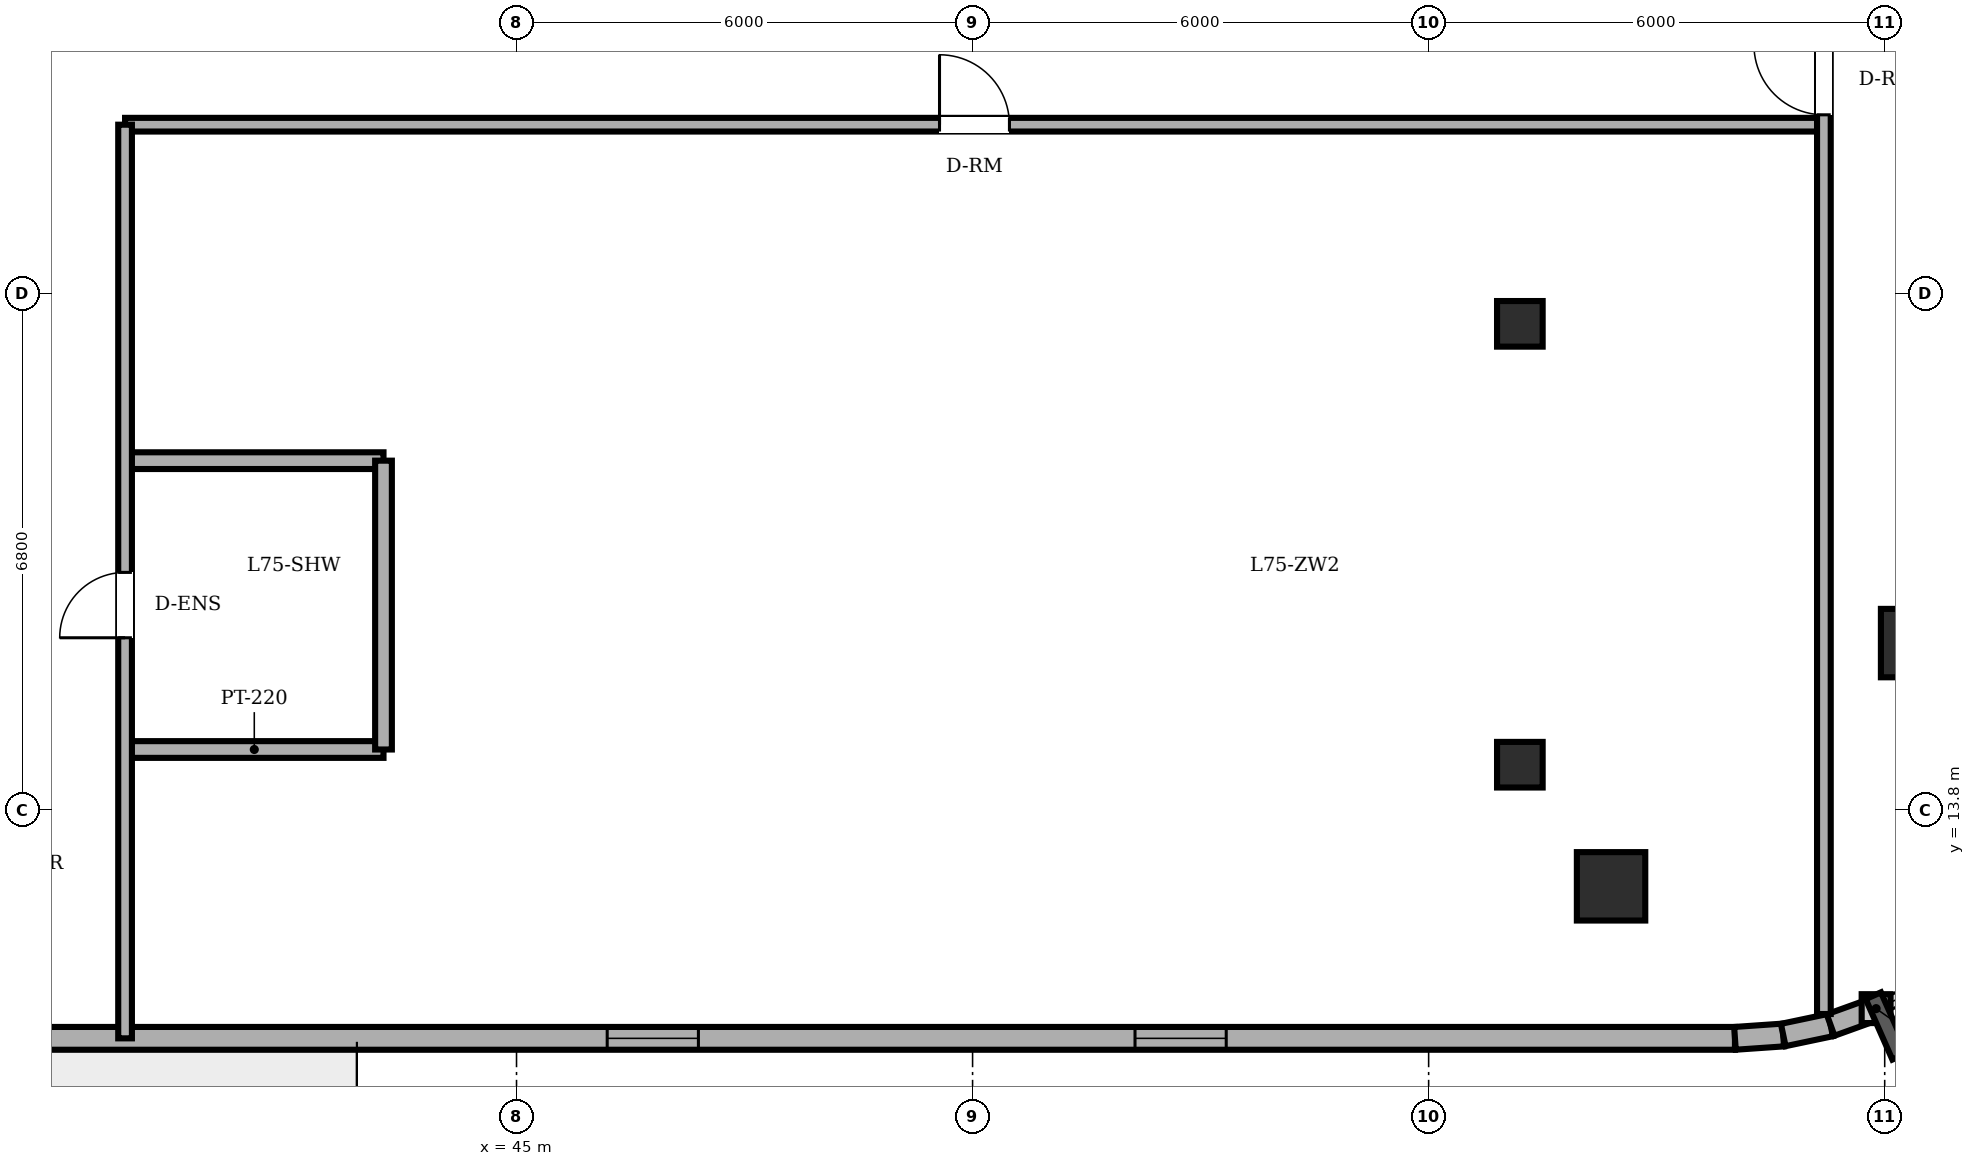
"""IFC4 building model, lengths in metres.
Left out: names, types, materials, properties, quantities, classifications, styles, units other than length and angle.
Written with IfcOpenShell. Run it as: python <this file> out.ifc"""

import sys

from ifc_helpers import new_model, si_unit, direction, frame, frame_2d, origin, origin_2d, place, context, subcontext, project, spatial, rectangle, circle, extrude, element, fill, save


model = new_model("IFC4")
c1 = context("Model", 3, precision=1e-05, world=origin(), true_north=direction((0.0, 1.0)))
c2 = subcontext(c1, "Body", "Model", "MODEL_VIEW")
j1 = project(units=[si_unit("LENGTHUNIT", "METRE"), si_unit("PLANEANGLEUNIT", "RADIAN")], contexts=[c1])
p1 = place(None, origin())
s1 = spatial("IfcSite", under=j1, at=p1, CompositionType="ELEMENT")
p2 = place(p1, origin())
s2 = spatial("IfcBuilding", under=s1, at=p2, CompositionType="ELEMENT")
p3 = place(p2, frame((0.0, 0.0, 288.0)))
s3 = spatial("IfcBuildingStorey", under=s2, at=p3, CompositionType="ELEMENT", Elevation=288.0)
for number, where, z_axis, x_axis in (
    (1, (59.4, 12.8, 0.0), (0.0, 0.0, 1.0), (1.0, 0.0, 0.0)),
    (2, (63.4, 16.0, 0.0), (0.0, 0.0, 1.0), (1.0, 0.0, 0.0)),
):
    element("IfcColumn", number, at=place(p3, frame(where, z_axis=z_axis, x_axis=x_axis)), inside=s3, PredefinedType="COLUMN", context=c2, shape_type="SweptSolid", body=[
        extrude(circle(Radius=0.45, at=origin_2d()), origin(), (0.0, 0.0, 1.0), 3.65),
    ])
for number, where, z_axis, x_axis in (
    (3, (58.2, 14.4, 0.0), (0.0, 0.0, 1.0), (1.0, 0.0, 0.0)),
    (4, (58.2, 20.2, 0.0), (0.0, 0.0, 1.0), (1.0, 0.0, 0.0)),
):
    element("IfcColumn", number, at=place(p3, frame(where, z_axis=z_axis, x_axis=x_axis)), inside=s3, PredefinedType="COLUMN", context=c2, shape_type="SweptSolid", body=[
        extrude(rectangle(XDim=0.6, YDim=0.6, at=origin_2d()), origin(), (0.0, 0.0, 1.0), 3.65),
    ])
p4 = place(p3, frame((24.0, 10.8, 0.0), z_axis=(0.0, 0.0, 1.0), x_axis=(1.0, 0.0, 0.0)))
e5 = element("IfcWall", 5, at=p4, inside=s3, PredefinedType="SOLIDWALL", context=c2, shape_type="SweptSolid", body=[
    extrude(rectangle(XDim=37.03, YDim=0.3, at=frame_2d((18.515, 0.0))), origin(), (0.0, 0.0, 1.0), 3.45),
])
p5 = place(p4, frame((10.925, 0.0, 0.0)))
e6 = element("IfcOpeningElement", 6, at=p5, cuts=e5, PredefinedType="OPENING", context=c2, shape_type="SweptSolid", body=[
    extrude(rectangle(XDim=0.95, YDim=2.2, at=frame_2d((0.475, 1.1))), frame((0.0, 0.16, 0.0), z_axis=(0.0, -1.0, 0.0), x_axis=(1.0, 0.0, 0.0)), (0.0, 0.0, 1.0), 0.32),
])
p6 = place(p4, frame((4.917, 0.0, 0.85)))
e7 = element("IfcOpeningElement", 7, at=p6, cuts=e5, PredefinedType="OPENING", context=c2, shape_type="SweptSolid", body=[
    extrude(rectangle(XDim=1.2, YDim=1.6, at=frame_2d((0.6, 0.8))), frame((0.0, 0.16, 0.0), z_axis=(0.0, -1.0, 0.0), x_axis=(1.0, 0.0, 0.0)), (0.0, 0.0, 1.0), 0.32),
])
p7 = place(p4, frame((22.193, 0.0, 0.85)))
e8 = element("IfcOpeningElement", 8, at=p7, cuts=e5, PredefinedType="OPENING", context=c2, shape_type="SweptSolid", body=[
    extrude(rectangle(XDim=1.2, YDim=1.6, at=frame_2d((0.6, 0.8))), frame((0.0, 0.16, 0.0), z_axis=(0.0, -1.0, 0.0), x_axis=(1.0, 0.0, 0.0)), (0.0, 0.0, 1.0), 0.32),
])
p8 = place(p4, frame((29.137, 0.0, 0.85)))
e9 = element("IfcOpeningElement", 9, at=p8, cuts=e5, PredefinedType="OPENING", context=c2, shape_type="SweptSolid", body=[
    extrude(rectangle(XDim=1.2, YDim=1.6, at=frame_2d((0.6, 0.8))), frame((0.0, 0.16, 0.0), z_axis=(0.0, -1.0, 0.0), x_axis=(1.0, 0.0, 0.0)), (0.0, 0.0, 1.0), 0.32),
])
p9 = place(p3, frame((61.03, 10.8, 0.0), z_axis=(0.0, 0.0, 1.0), x_axis=(0.997613959688, 0.069039028352, 0.0)))
e10 = element("IfcWall", 10, at=p9, inside=s3, PredefinedType="SOLIDWALL", context=c2, shape_type="SweptSolid", body=[
    extrude(rectangle(XDim=0.636, YDim=0.3, at=frame_2d((0.318, 0.0))), origin(), (0.0, 0.0, 1.0), 3.45),
])
p10 = place(p3, frame((61.665, 10.844, 0.0), z_axis=(0.0, 0.0, 1.0), x_axis=(0.97857012251, 0.205913854149, 0.0)))
e11 = element("IfcWall", 11, at=p10, inside=s3, PredefinedType="SOLIDWALL", context=c2, shape_type="SweptSolid", body=[
    extrude(rectangle(XDim=0.637, YDim=0.3, at=frame_2d((0.318, 0.0))), origin(), (0.0, 0.0, 1.0), 3.45),
])
p11 = place(p3, frame((62.288, 10.975, 0.0), z_axis=(0.0, 0.0, 1.0), x_axis=(0.94077491148, 0.339031806665, 0.0)))
e12 = element("IfcWall", 12, at=p11, inside=s3, PredefinedType="SOLIDWALL", context=c2, shape_type="SweptSolid", body=[
    extrude(rectangle(XDim=0.636, YDim=0.3, at=frame_2d((0.318, 0.0))), origin(), (0.0, 0.0, 1.0), 3.45),
])
p12 = place(p3, frame((39.85, 14.6, 0.0), z_axis=(0.0, 0.0, 1.0), x_axis=(1.0, 0.0, 0.0)))
e13 = element("IfcWall", 13, at=p12, inside=s3, PredefinedType="PARTITIONING", context=c2, shape_type="SweptSolid", body=[
    extrude(rectangle(XDim=3.4, YDim=0.22, at=frame_2d((1.7, 0.0))), origin(), (0.0, 0.0, 1.0), 3.092),
])
p13 = place(p3, frame((39.85, 18.4, 0.0), z_axis=(0.0, 0.0, 1.0), x_axis=(1.0, 0.0, 0.0)))
e14 = element("IfcWall", 14, at=p13, inside=s3, PredefinedType="PARTITIONING", context=c2, shape_type="SweptSolid", body=[
    extrude(rectangle(XDim=3.4, YDim=0.22, at=frame_2d((1.7, 0.0))), origin(), (0.0, 0.0, 1.0), 3.45),
])
p14 = place(p3, frame((39.85, 22.82, 0.0), z_axis=(0.0, 0.0, 1.0), x_axis=(1.0, 0.0, 0.0)))
e15 = element("IfcWall", 15, at=p14, inside=s3, PredefinedType="PARTITIONING", context=c2, shape_type="SweptSolid", body=[
    extrude(rectangle(XDim=22.35, YDim=0.18, at=frame_2d((11.175, 0.0))), origin(), (0.0, 0.0, 1.0), 3.45),
])
p15 = place(p14, frame((10.715, 0.0, 0.0)))
e16 = element("IfcOpeningElement", 16, at=p15, cuts=e15, PredefinedType="OPENING", context=c2, shape_type="SweptSolid", body=[
    extrude(rectangle(XDim=0.92, YDim=2.1, at=frame_2d((0.46, 1.05))), frame((0.0, 0.1, 0.0), z_axis=(0.0, -1.0, 0.0), x_axis=(1.0, 0.0, 0.0)), (0.0, 0.0, 1.0), 0.2),
])
p16 = place(p3, frame((39.85, 10.8, 0.0), z_axis=(0.0, 0.0, 1.0), x_axis=(0.0, 1.0, 0.0)))
e17 = element("IfcWall", 17, at=p16, inside=s3, PredefinedType="PARTITIONING", context=c2, shape_type="SweptSolid", body=[
    extrude(rectangle(XDim=12.02, YDim=0.18, at=frame_2d((6.01, 0.0))), origin(), (0.0, 0.0, 1.0), 3.45),
])
p17 = place(p16, frame((5.27, 0.0, 0.0)))
e18 = element("IfcOpeningElement", 18, at=p17, cuts=e17, PredefinedType="OPENING", context=c2, shape_type="SweptSolid", body=[
    extrude(rectangle(XDim=0.86, YDim=2.1, at=frame_2d((0.43, 1.05))), frame((0.0, 0.1, 0.0), z_axis=(0.0, -1.0, 0.0), x_axis=(1.0, 0.0, 0.0)), (0.0, 0.0, 1.0), 0.2),
])
p18 = place(p3, frame((43.25, 14.6, 0.0), z_axis=(0.0, 0.0, 1.0), x_axis=(0.0, 1.0, 0.0)))
e19 = element("IfcWall", 19, at=p18, inside=s3, PredefinedType="PARTITIONING", context=c2, shape_type="SweptSolid", body=[
    extrude(rectangle(XDim=3.8, YDim=0.22, at=frame_2d((1.9, 0.0))), origin(), (0.0, 0.0, 1.0), 3.45),
])
p19 = place(p3, frame((62.2, 11.12, 0.0), z_axis=(0.0, 0.0, 1.0), x_axis=(0.0, 1.0, 0.0)))
e20 = element("IfcWall", 20, at=p19, inside=s3, PredefinedType="PARTITIONING", context=c2, shape_type="SweptSolid", body=[
    extrude(rectangle(XDim=19.23, YDim=0.18, at=frame_2d((9.615, 0.0))), origin(), (0.0, 0.0, 1.0), 3.45),
])
p20 = place(p19, frame((15.295, 0.0, 0.0)))
e21 = element("IfcOpeningElement", 21, at=p20, cuts=e20, PredefinedType="OPENING", context=c2, shape_type="SweptSolid", body=[
    extrude(rectangle(XDim=1.0, YDim=2.15, at=frame_2d((0.5, 1.075))), frame((0.0, 0.1, 0.0), z_axis=(0.0, -1.0, 0.0), x_axis=(1.0, 0.0, 0.0)), (0.0, 0.0, 1.0), 0.2),
])
p21 = place(p19, frame((11.83, 0.0, 0.0)))
e22 = element("IfcOpeningElement", 22, at=p21, cuts=e20, PredefinedType="OPENING", context=c2, shape_type="SweptSolid", body=[
    extrude(rectangle(XDim=0.92, YDim=2.1, at=frame_2d((0.46, 1.05))), frame((0.0, 0.1, 0.0), z_axis=(0.0, -1.0, 0.0), x_axis=(1.0, 0.0, 0.0)), (0.0, 0.0, 1.0), 0.2),
])
p22 = place(p7, origin())
e23 = element("IfcWindow", 23, at=p22, inside=s3, PartitioningType="SINGLE_PANEL", PredefinedType="WINDOW", context=c2, shape_type="SweptSolid", body=[
    extrude(rectangle(XDim=1.2, YDim=1.6, at=frame_2d((0.6, 0.8))), frame((0.0, 0.03, 0.0), z_axis=(0.0, -1.0, 0.0), x_axis=(1.0, 0.0, 0.0)), (0.0, 0.0, 1.0), 0.06),
])
fill(e8, e23)
p23 = place(p8, origin())
e24 = element("IfcWindow", 24, at=p23, inside=s3, PartitioningType="SINGLE_PANEL", PredefinedType="WINDOW", context=c2, shape_type="SweptSolid", body=[
    extrude(rectangle(XDim=1.2, YDim=1.6, at=frame_2d((0.6, 0.8))), frame((0.0, 0.03, 0.0), z_axis=(0.0, -1.0, 0.0), x_axis=(1.0, 0.0, 0.0)), (0.0, 0.0, 1.0), 0.06),
])
fill(e9, e24)
p24 = place(p17, origin())
e25 = element("IfcDoor", 25, at=p24, inside=s3, OperationType="SINGLE_SWING_LEFT", PredefinedType="DOOR", context=c2, shape_type="SweptSolid", body=[
    extrude(rectangle(XDim=0.86, YDim=2.1, at=frame_2d((0.43, 1.05))), frame((0.0, 0.025, 0.0), z_axis=(0.0, -1.0, 0.0), x_axis=(1.0, 0.0, 0.0)), (0.0, 0.0, 1.0), 0.05),
])
fill(e18, e25)
p25 = place(p15, origin())
e26 = element("IfcDoor", 26, at=p25, inside=s3, OperationType="SINGLE_SWING_LEFT", PredefinedType="DOOR", context=c2, shape_type="SweptSolid", body=[
    extrude(rectangle(XDim=0.92, YDim=2.1, at=frame_2d((0.46, 1.05))), frame((0.0, 0.025, 0.0), z_axis=(0.0, -1.0, 0.0), x_axis=(1.0, 0.0, 0.0)), (0.0, 0.0, 1.0), 0.05),
])
fill(e16, e26)
p26 = place(p21, origin())
e27 = element("IfcDoor", 27, at=p26, inside=s3, OperationType="SINGLE_SWING_RIGHT", PredefinedType="DOOR", context=c2, shape_type="SweptSolid", body=[
    extrude(rectangle(XDim=0.92, YDim=2.1, at=frame_2d((0.46, 1.05))), frame((0.0, 0.025, 0.0), z_axis=(0.0, -1.0, 0.0), x_axis=(1.0, 0.0, 0.0)), (0.0, 0.0, 1.0), 0.05),
])
fill(e22, e27)
save(model, sys.argv[1])
